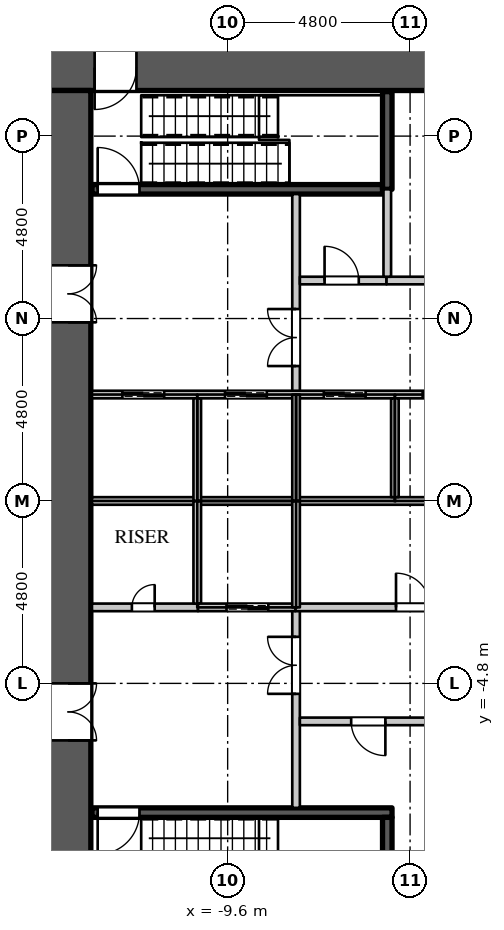
"""IFC4 building model, lengths in metres.
Left out: names, types, materials, properties, quantities, classifications, styles, units other than length and angle.
Written with IfcOpenShell. Run it as: python <this file> out.ifc"""

import sys

from ifc_helpers import new_model, si_unit, direction, frame, frame_2d, origin, place, context, subcontext, project, spatial, rectangle, extrude, element, fill, save


model = new_model("IFC4")
c1 = context("Model", 3, precision=1e-05, world=origin(), true_north=direction((0.0, 1.0)))
c2 = subcontext(c1, "Body", "Model", "MODEL_VIEW")
j1 = project(units=[si_unit("LENGTHUNIT", "METRE"), si_unit("PLANEANGLEUNIT", "RADIAN")], contexts=[c1])
p1 = place(None, origin())
s1 = spatial("IfcSite", under=j1, at=p1, CompositionType="ELEMENT")
p2 = place(p1, origin())
s2 = spatial("IfcBuilding", under=s1, at=p2, CompositionType="ELEMENT")
p3 = place(p2, frame((0.0, 0.0, -9.0)))
s3 = spatial("IfcBuildingStorey", under=s2, at=p3, CompositionType="ELEMENT", Elevation=-9.0)
p4 = place(p3, frame((-14.4, 11.4, 0.0), z_axis=(0.0, 0.0, 1.0), x_axis=(1.0, 0.0, 0.0)))
e1 = element("IfcWall", 1, at=p4, inside=s3, PredefinedType="SHEAR", context=c2, shape_type="SweptSolid", body=[
    extrude(rectangle(XDim=28.8, YDim=1.2, at=frame_2d((14.4, 0.0))), origin(), (0.0, 0.0, 1.0), 4.5),
])
p5 = place(p4, frame((1.3, 0.0, 0.0)))
e2 = element("IfcOpeningElement", 2, at=p5, cuts=e1, PredefinedType="OPENING", context=c2, shape_type="SweptSolid", body=[
    extrude(rectangle(XDim=1.1, YDim=2.2, at=frame_2d((0.55, 1.1))), frame((0.0, 0.61, 0.0), z_axis=(0.0, -1.0, 0.0), x_axis=(1.0, 0.0, 0.0)), (0.0, 0.0, 1.0), 1.22),
])
p6 = place(p4, frame((26.4, 0.0, 0.0)))
e3 = element("IfcOpeningElement", 3, at=p6, cuts=e1, PredefinedType="OPENING", context=c2, shape_type="SweptSolid", body=[
    extrude(rectangle(XDim=1.1, YDim=2.2, at=frame_2d((0.55, 1.1))), frame((0.0, 0.61, 0.0), z_axis=(0.0, -1.0, 0.0), x_axis=(1.0, 0.0, 0.0)), (0.0, 0.0, 1.0), 1.22),
])
p7 = place(p3, frame((-13.8, -10.8, 0.0), z_axis=(0.0, 0.0, 1.0), x_axis=(0.0, 1.0, 0.0)))
e4 = element("IfcWall", 4, at=p7, inside=s3, PredefinedType="SHEAR", context=c2, shape_type="SweptSolid", body=[
    extrude(rectangle(XDim=21.6, YDim=1.2, at=frame_2d((10.8, 0.0))), origin(), (0.0, 0.0, 1.0), 4.5),
])
p8 = place(p7, frame((15.5, 0.0, 0.0)))
e5 = element("IfcOpeningElement", 5, at=p8, cuts=e4, PredefinedType="OPENING", context=c2, shape_type="SweptSolid", body=[
    extrude(rectangle(XDim=1.5, YDim=2.4, at=frame_2d((0.75, 1.2))), frame((0.0, 0.61, 0.0), z_axis=(0.0, -1.0, 0.0), x_axis=(1.0, 0.0, 0.0)), (0.0, 0.0, 1.0), 1.22),
])
p9 = place(p7, frame((4.5, 0.0, 0.0)))
e6 = element("IfcOpeningElement", 6, at=p9, cuts=e4, PredefinedType="OPENING", context=c2, shape_type="SweptSolid", body=[
    extrude(rectangle(XDim=1.5, YDim=2.4, at=frame_2d((0.75, 1.2))), frame((0.0, 0.61, 0.0), z_axis=(0.0, -1.0, 0.0), x_axis=(1.0, 0.0, 0.0)), (0.0, 0.0, 1.0), 1.22),
])
p10 = place(p3, frame((-7.8, -8.075, 0.0), z_axis=(0.0, 0.0, 1.0), x_axis=(0.0, 1.0, 0.0)))
e7 = element("IfcWall", 7, at=p10, inside=s3, PredefinedType="PARTITIONING", context=c2, shape_type="SweptSolid", body=[
    extrude(rectangle(XDim=5.275, YDim=0.2, at=frame_2d((2.637, 0.0))), origin(), (0.0, 0.0, 1.0), 4.048),
])
p11 = place(p10, frame((3.0, 0.0, 0.0)))
e8 = element("IfcOpeningElement", 8, at=p11, cuts=e7, PredefinedType="OPENING", context=c2, shape_type="SweptSolid", body=[
    extrude(rectangle(XDim=1.5, YDim=2.4, at=frame_2d((0.75, 1.2))), frame((0.0, 0.11, 0.0), z_axis=(0.0, -1.0, 0.0), x_axis=(1.0, 0.0, 0.0)), (0.0, 0.0, 1.0), 0.22),
])
p12 = place(p3, frame((-7.7, -5.8, 0.0), z_axis=(0.0, 0.0, 1.0), x_axis=(1.0, 0.0, 0.0)))
e9 = element("IfcWall", 9, at=p12, inside=s3, PredefinedType="PARTITIONING", context=c2, shape_type="SweptSolid", body=[
    extrude(rectangle(XDim=20.87, YDim=0.2, at=frame_2d((10.435, 0.0))), origin(), (0.0, 0.0, 1.0), 4.048),
])
p13 = place(p12, frame((1.35, 0.0, 0.0)))
e10 = element("IfcOpeningElement", 10, at=p13, cuts=e9, PredefinedType="OPENING", context=c2, shape_type="SweptSolid", body=[
    extrude(rectangle(XDim=0.9, YDim=2.2, at=frame_2d((0.45, 1.1))), frame((0.0, 0.11, 0.0), z_axis=(0.0, -1.0, 0.0), x_axis=(1.0, 0.0, 0.0)), (0.0, 0.0, 1.0), 0.22),
])
p14 = place(p12, frame((5.75, 0.0, 0.0)))
e11 = element("IfcOpeningElement", 11, at=p14, cuts=e9, PredefinedType="OPENING", context=c2, shape_type="SweptSolid", body=[
    extrude(rectangle(XDim=0.9, YDim=2.2, at=frame_2d((0.45, 1.1))), frame((0.0, 0.11, 0.0), z_axis=(0.0, -1.0, 0.0), x_axis=(1.0, 0.0, 0.0)), (0.0, 0.0, 1.0), 0.22),
])
p15 = place(p12, frame((12.0, 0.0, 0.0)))
e12 = element("IfcOpeningElement", 12, at=p15, cuts=e9, PredefinedType="OPENING", context=c2, shape_type="SweptSolid", body=[
    extrude(rectangle(XDim=0.9, YDim=2.2, at=frame_2d((0.45, 1.1))), frame((0.0, 0.11, 0.0), z_axis=(0.0, -1.0, 0.0), x_axis=(1.0, 0.0, 0.0)), (0.0, 0.0, 1.0), 0.22),
])
p16 = place(p12, frame((17.95, 0.0, 0.0)))
e13 = element("IfcOpeningElement", 13, at=p16, cuts=e9, PredefinedType="OPENING", context=c2, shape_type="SweptSolid", body=[
    extrude(rectangle(XDim=0.9, YDim=2.2, at=frame_2d((0.45, 1.1))), frame((0.0, 0.11, 0.0), z_axis=(0.0, -1.0, 0.0), x_axis=(1.0, 0.0, 0.0)), (0.0, 0.0, 1.0), 0.22),
])
p17 = place(p3, frame((-7.8, 2.8, 0.0), z_axis=(0.0, 0.0, 1.0), x_axis=(0.0, 1.0, 0.0)))
e14 = element("IfcWall", 14, at=p17, inside=s3, PredefinedType="PARTITIONING", context=c2, shape_type="SweptSolid", body=[
    extrude(rectangle(XDim=5.275, YDim=0.2, at=frame_2d((2.637, 0.0))), origin(), (0.0, 0.0, 1.0), 4.048),
])
p18 = place(p17, frame((0.75, 0.0, 0.0)))
e15 = element("IfcOpeningElement", 15, at=p18, cuts=e14, PredefinedType="OPENING", context=c2, shape_type="SweptSolid", body=[
    extrude(rectangle(XDim=1.5, YDim=2.4, at=frame_2d((0.75, 1.2))), frame((0.0, 0.11, 0.0), z_axis=(0.0, -1.0, 0.0), x_axis=(1.0, 0.0, 0.0)), (0.0, 0.0, 1.0), 0.22),
])
p19 = place(p3, frame((-7.7, 5.8, 0.0), z_axis=(0.0, 0.0, 1.0), x_axis=(1.0, 0.0, 0.0)))
e16 = element("IfcWall", 16, at=p19, inside=s3, PredefinedType="PARTITIONING", context=c2, shape_type="SweptSolid", body=[
    extrude(rectangle(XDim=2.28, YDim=0.2, at=frame_2d((1.14, 0.0))), origin(), (0.0, 0.0, 1.0), 4.048),
])
p20 = place(p19, frame((0.65, 0.0, 0.0)))
e17 = element("IfcOpeningElement", 17, at=p20, cuts=e16, PredefinedType="OPENING", context=c2, shape_type="SweptSolid", body=[
    extrude(rectangle(XDim=0.9, YDim=2.2, at=frame_2d((0.45, 1.1))), frame((0.0, 0.11, 0.0), z_axis=(0.0, -1.0, 0.0), x_axis=(1.0, 0.0, 0.0)), (0.0, 0.0, 1.0), 0.22),
])
p21 = place(p3, frame((-13.17, -2.8, 0.0), z_axis=(0.0, 0.0, 1.0), x_axis=(1.0, 0.0, 0.0)))
e18 = element("IfcWall", 18, at=p21, inside=s3, PredefinedType="PARTITIONING", context=c2, shape_type="SweptSolid", body=[
    extrude(rectangle(XDim=2.79, YDim=0.2, at=frame_2d((1.395, 0.0))), origin(), (0.0, 0.0, 1.0), 4.048),
])
p22 = place(p21, frame((1.05, 0.0, 0.0)))
e19 = element("IfcOpeningElement", 19, at=p22, cuts=e18, PredefinedType="OPENING", context=c2, shape_type="SweptSolid", body=[
    extrude(rectangle(XDim=0.6, YDim=2.0, at=frame_2d((0.3, 1.0))), frame((0.0, 0.11, 0.0), z_axis=(0.0, -1.0, 0.0), x_axis=(1.0, 0.0, 0.0)), (0.0, 0.0, 1.0), 0.22),
])
p23 = place(p3, frame((-7.82, -2.8, 0.0), z_axis=(0.0, 0.0, 1.0), x_axis=(1.0, 0.0, 0.0)))
e20 = element("IfcWall", 20, at=p23, inside=s3, PredefinedType="PARTITIONING", context=c2, shape_type="SweptSolid", body=[
    extrude(rectangle(XDim=6.2, YDim=0.2, at=frame_2d((3.1, 0.0))), origin(), (0.0, 0.0, 1.0), 4.048),
])
p24 = place(p23, frame((2.65, 0.0, 0.0)))
e21 = element("IfcOpeningElement", 21, at=p24, cuts=e20, PredefinedType="OPENING", context=c2, shape_type="SweptSolid", body=[
    extrude(rectangle(XDim=0.9, YDim=2.2, at=frame_2d((0.45, 1.1))), frame((0.0, 0.11, 0.0), z_axis=(0.0, -1.0, 0.0), x_axis=(1.0, 0.0, 0.0)), (0.0, 0.0, 1.0), 0.22),
])
p25 = place(p3, frame((-5.42, 5.8, 0.0), z_axis=(0.0, 0.0, 1.0), x_axis=(1.0, 0.0, 0.0)))
e22 = element("IfcWall", 22, at=p25, inside=s3, PredefinedType="PARTITIONING", context=c2, shape_type="SweptSolid", body=[
    extrude(rectangle(XDim=10.04, YDim=0.2, at=frame_2d((5.02, 0.0))), origin(), (0.0, 0.0, 1.0), 4.048),
])
p26 = place(p25, frame((1.8, 0.0, 0.0)))
e23 = element("IfcOpeningElement", 23, at=p26, cuts=e22, PredefinedType="OPENING", context=c2, shape_type="SweptSolid", body=[
    extrude(rectangle(XDim=0.9, YDim=2.2, at=frame_2d((0.45, 1.1))), frame((0.0, 0.11, 0.0), z_axis=(0.0, -1.0, 0.0), x_axis=(1.0, 0.0, 0.0)), (0.0, 0.0, 1.0), 0.22),
])
p27 = place(p25, frame((6.7, 0.0, 0.0)))
e24 = element("IfcOpeningElement", 24, at=p27, cuts=e22, PredefinedType="OPENING", context=c2, shape_type="SweptSolid", body=[
    extrude(rectangle(XDim=0.9, YDim=2.2, at=frame_2d((0.45, 1.1))), frame((0.0, 0.11, 0.0), z_axis=(0.0, -1.0, 0.0), x_axis=(1.0, 0.0, 0.0)), (0.0, 0.0, 1.0), 0.22),
])
p28 = place(p3, frame((-5.4, 5.9, 0.0), z_axis=(0.0, 0.0, 1.0), x_axis=(0.0, 1.0, 0.0)))
e25 = element("IfcWall", 25, at=p28, inside=s3, PredefinedType="PARTITIONING", context=c2, shape_type="SweptSolid", body=[
    extrude(rectangle(XDim=2.3, YDim=0.2, at=frame_2d((1.15, 0.0))), origin(), (0.0, 0.0, 1.0), 4.048),
])
p29 = place(p3, frame((-13.17, 0.0, 0.0), z_axis=(0.0, 0.0, 1.0), x_axis=(1.0, 0.0, 0.0)))
e26 = element("IfcWall", 26, at=p29, inside=s3, PredefinedType="PARTITIONING", context=c2, shape_type="SweptSolid", body=[
    extrude(rectangle(XDim=20.97, YDim=0.2, at=frame_2d((10.485, 0.0))), origin(), (0.0, 0.0, 1.0), 4.048),
])
p30 = place(p3, frame((-13.17, 2.8, 0.0), z_axis=(0.0, 0.0, 1.0), x_axis=(1.0, 0.0, 0.0)))
e27 = element("IfcWall", 27, at=p30, inside=s3, PredefinedType="PARTITIONING", context=c2, shape_type="SweptSolid", body=[
    extrude(rectangle(XDim=20.97, YDim=0.2, at=frame_2d((10.485, 0.0))), origin(), (0.0, 0.0, 1.0), 4.048),
])
p31 = place(p30, frame((0.8, 0.0, 0.0)))
e28 = element("IfcOpeningElement", 28, at=p31, cuts=e27, PredefinedType="OPENING", context=c2, shape_type="SweptSolid", body=[
    extrude(rectangle(XDim=1.1, YDim=2.2, at=frame_2d((0.55, 1.1))), frame((0.0, 0.11, 0.0), z_axis=(0.0, -1.0, 0.0), x_axis=(1.0, 0.0, 0.0)), (0.0, 0.0, 1.0), 0.22),
])
p32 = place(p30, frame((3.5, 0.0, 0.0)))
e29 = element("IfcOpeningElement", 29, at=p32, cuts=e27, PredefinedType="OPENING", context=c2, shape_type="SweptSolid", body=[
    extrude(rectangle(XDim=1.1, YDim=2.2, at=frame_2d((0.55, 1.1))), frame((0.0, 0.11, 0.0), z_axis=(0.0, -1.0, 0.0), x_axis=(1.0, 0.0, 0.0)), (0.0, 0.0, 1.0), 0.22),
])
p33 = place(p30, frame((6.1, 0.0, 0.0)))
e30 = element("IfcOpeningElement", 30, at=p33, cuts=e27, PredefinedType="OPENING", context=c2, shape_type="SweptSolid", body=[
    extrude(rectangle(XDim=1.1, YDim=2.2, at=frame_2d((0.55, 1.1))), frame((0.0, 0.11, 0.0), z_axis=(0.0, -1.0, 0.0), x_axis=(1.0, 0.0, 0.0)), (0.0, 0.0, 1.0), 0.22),
])
p34 = place(p30, frame((8.7, 0.0, 0.0)))
e31 = element("IfcOpeningElement", 31, at=p34, cuts=e27, PredefinedType="OPENING", context=c2, shape_type="SweptSolid", body=[
    extrude(rectangle(XDim=1.1, YDim=2.2, at=frame_2d((0.55, 1.1))), frame((0.0, 0.11, 0.0), z_axis=(0.0, -1.0, 0.0), x_axis=(1.0, 0.0, 0.0)), (0.0, 0.0, 1.0), 0.22),
])
p35 = place(p30, frame((11.3, 0.0, 0.0)))
e32 = element("IfcOpeningElement", 32, at=p35, cuts=e27, PredefinedType="OPENING", context=c2, shape_type="SweptSolid", body=[
    extrude(rectangle(XDim=1.1, YDim=2.2, at=frame_2d((0.55, 1.1))), frame((0.0, 0.11, 0.0), z_axis=(0.0, -1.0, 0.0), x_axis=(1.0, 0.0, 0.0)), (0.0, 0.0, 1.0), 0.22),
])
p36 = place(p30, frame((13.9, 0.0, 0.0)))
e33 = element("IfcOpeningElement", 33, at=p36, cuts=e27, PredefinedType="OPENING", context=c2, shape_type="SweptSolid", body=[
    extrude(rectangle(XDim=1.1, YDim=2.2, at=frame_2d((0.55, 1.1))), frame((0.0, 0.11, 0.0), z_axis=(0.0, -1.0, 0.0), x_axis=(1.0, 0.0, 0.0)), (0.0, 0.0, 1.0), 0.22),
])
p37 = place(p30, frame((16.5, 0.0, 0.0)))
e34 = element("IfcOpeningElement", 34, at=p37, cuts=e27, PredefinedType="OPENING", context=c2, shape_type="SweptSolid", body=[
    extrude(rectangle(XDim=1.1, YDim=2.2, at=frame_2d((0.55, 1.1))), frame((0.0, 0.11, 0.0), z_axis=(0.0, -1.0, 0.0), x_axis=(1.0, 0.0, 0.0)), (0.0, 0.0, 1.0), 0.22),
])
p38 = place(p30, frame((19.1, 0.0, 0.0)))
e35 = element("IfcOpeningElement", 35, at=p38, cuts=e27, PredefinedType="OPENING", context=c2, shape_type="SweptSolid", body=[
    extrude(rectangle(XDim=1.1, YDim=2.2, at=frame_2d((0.55, 1.1))), frame((0.0, 0.11, 0.0), z_axis=(0.0, -1.0, 0.0), x_axis=(1.0, 0.0, 0.0)), (0.0, 0.0, 1.0), 0.22),
])
p39 = place(p3, frame((-10.4, -2.7, 0.0), z_axis=(0.0, 0.0, 1.0), x_axis=(0.0, 1.0, 0.0)))
e36 = element("IfcWall", 36, at=p39, inside=s3, PredefinedType="PARTITIONING", context=c2, shape_type="SweptSolid", body=[
    extrude(rectangle(XDim=2.7, YDim=0.2, at=frame_2d((1.35, 0.0))), origin(), (0.0, 0.0, 1.0), 4.048),
])
p40 = place(p3, frame((-10.38, -2.8, 0.0), z_axis=(0.0, 0.0, 1.0), x_axis=(1.0, 0.0, 0.0)))
e37 = element("IfcWall", 37, at=p40, inside=s3, PredefinedType="PARTITIONING", context=c2, shape_type="SweptSolid", body=[
    extrude(rectangle(XDim=2.56, YDim=0.2, at=frame_2d((1.28, 0.0))), origin(), (0.0, 0.0, 1.0), 4.048),
])
p41 = place(p40, frame((0.75, 0.0, 0.0)))
e38 = element("IfcOpeningElement", 38, at=p41, cuts=e37, PredefinedType="OPENING", context=c2, shape_type="SweptSolid", body=[
    extrude(rectangle(XDim=1.1, YDim=2.2, at=frame_2d((0.55, 1.1))), frame((0.0, 0.11, 0.0), z_axis=(0.0, -1.0, 0.0), x_axis=(1.0, 0.0, 0.0)), (0.0, 0.0, 1.0), 0.22),
])
p42 = place(p3, frame((-10.4, 0.0, 0.0), z_axis=(0.0, 0.0, 1.0), x_axis=(0.0, 1.0, 0.0)))
e39 = element("IfcWall", 39, at=p42, inside=s3, PredefinedType="PARTITIONING", context=c2, shape_type="SweptSolid", body=[
    extrude(rectangle(XDim=2.7, YDim=0.2, at=frame_2d((1.35, 0.0))), origin(), (0.0, 0.0, 1.0), 4.048),
])
for number, where, z_axis, x_axis in (
    (40, (-7.8, -2.8, 0.0), (0.0, 0.0, 1.0), (0.0, 1.0, 0.0)),
    (41, (-7.8, 0.0, 0.0), (0.0, 0.0, 1.0), (0.0, 1.0, 0.0)),
):
    element("IfcWall", number, at=place(p3, frame(where, z_axis=z_axis, x_axis=x_axis)), inside=s3, PredefinedType="PARTITIONING", context=c2, shape_type="SweptSolid", body=[
        extrude(rectangle(XDim=2.8, YDim=0.2, at=frame_2d((1.4, 0.0))), origin(), (0.0, 0.0, 1.0), 4.048),
    ])
p43 = place(p3, frame((-5.2, 0.1, 0.0), z_axis=(0.0, 0.0, 1.0), x_axis=(0.0, 1.0, 0.0)))
e42 = element("IfcWall", 42, at=p43, inside=s3, PredefinedType="PARTITIONING", context=c2, shape_type="SweptSolid", body=[
    extrude(rectangle(XDim=2.6, YDim=0.2, at=frame_2d((1.3, 0.0))), origin(), (0.0, 0.0, 1.0), 4.048),
])
p44 = place(p3, frame((-13.17, -8.2, 0.0), z_axis=(0.0, 0.0, 1.0), x_axis=(1.0, 0.0, 0.0)))
e43 = element("IfcWall", 43, at=p44, inside=s3, PredefinedType="SHEAR", context=c2, shape_type="SweptSolid", body=[
    extrude(rectangle(XDim=7.895, YDim=0.25, at=frame_2d((3.948, 0.0))), origin(), (0.0, 0.0, 1.0), 4.048),
])
p45 = place(p44, frame((0.15, 0.0, 0.0)))
e44 = element("IfcOpeningElement", 44, at=p45, cuts=e43, PredefinedType="OPENING", context=c2, shape_type="SweptSolid", body=[
    extrude(rectangle(XDim=1.1, YDim=2.2, at=frame_2d((0.55, 1.1))), frame((0.0, 0.135, 0.0), z_axis=(0.0, -1.0, 0.0), x_axis=(1.0, 0.0, 0.0)), (0.0, 0.0, 1.0), 0.27),
])
p46 = place(p3, frame((-13.17, 8.2, 0.0), z_axis=(0.0, 0.0, 1.0), x_axis=(1.0, 0.0, 0.0)))
e45 = element("IfcWall", 45, at=p46, inside=s3, PredefinedType="SHEAR", context=c2, shape_type="SweptSolid", body=[
    extrude(rectangle(XDim=7.645, YDim=0.25, at=frame_2d((3.823, 0.0))), origin(), (0.0, 0.0, 1.0), 4.048),
])
p47 = place(p46, frame((0.15, 0.0, 0.0)))
e46 = element("IfcOpeningElement", 46, at=p47, cuts=e45, PredefinedType="OPENING", context=c2, shape_type="SweptSolid", body=[
    extrude(rectangle(XDim=1.1, YDim=2.2, at=frame_2d((0.55, 1.1))), frame((0.0, 0.135, 0.0), z_axis=(0.0, -1.0, 0.0), x_axis=(1.0, 0.0, 0.0)), (0.0, 0.0, 1.0), 0.27),
])
p48 = place(p3, frame((-5.4, -10.77, 0.0), z_axis=(0.0, 0.0, 1.0), x_axis=(0.0, 1.0, 0.0)))
e47 = element("IfcWall", 47, at=p48, inside=s3, PredefinedType="SHEAR", context=c2, shape_type="SweptSolid", body=[
    extrude(rectangle(XDim=2.445, YDim=0.25, at=frame_2d((1.223, 0.0))), origin(), (0.0, 0.0, 1.0), 4.048),
])
p49 = place(p3, frame((-5.4, 8.2, 0.0), z_axis=(0.0, 0.0, 1.0), x_axis=(0.0, 1.0, 0.0)))
e48 = element("IfcWall", 48, at=p49, inside=s3, PredefinedType="SHEAR", context=c2, shape_type="SweptSolid", body=[
    extrude(rectangle(XDim=2.57, YDim=0.25, at=frame_2d((1.285, 0.0))), origin(), (0.0, 0.0, 1.0), 4.048),
])
p50 = place(p22, origin())
e49 = element("IfcDoor", 49, at=p50, inside=s3, OperationType="SINGLE_SWING_RIGHT", PredefinedType="DOOR", context=c2, shape_type="SweptSolid", body=[
    extrude(rectangle(XDim=0.6, YDim=2.0, at=frame_2d((0.3, 1.0))), frame((0.0, 0.025, 0.0), z_axis=(0.0, -1.0, 0.0), x_axis=(1.0, 0.0, 0.0)), (0.0, 0.0, 1.0), 0.05),
])
fill(e19, e49)
p51 = place(p20, origin())
e50 = element("IfcDoor", 50, at=p51, inside=s3, OperationType="SINGLE_SWING_LEFT", PredefinedType="DOOR", context=c2, shape_type="SweptSolid", body=[
    extrude(rectangle(XDim=0.9, YDim=2.2, at=frame_2d((0.45, 1.1))), frame((0.0, 0.025, 0.0), z_axis=(0.0, -1.0, 0.0), x_axis=(1.0, 0.0, 0.0)), (0.0, 0.0, 1.0), 0.05),
])
fill(e17, e50)
p52 = place(p13, origin())
e51 = element("IfcDoor", 51, at=p52, inside=s3, OperationType="SINGLE_SWING_LEFT", PredefinedType="DOOR", context=c2, shape_type="SweptSolid", body=[
    extrude(rectangle(XDim=0.9, YDim=2.2, at=frame_2d((0.45, 1.1))), frame((0.0, 0.025, 0.0), z_axis=(0.0, -1.0, 0.0), x_axis=(1.0, 0.0, 0.0)), (0.0, 0.0, 1.0), 0.05),
])
fill(e10, e51)
p53 = place(p24, origin())
e52 = element("IfcDoor", 52, at=p53, inside=s3, OperationType="SINGLE_SWING_LEFT", PredefinedType="DOOR", context=c2, shape_type="SweptSolid", body=[
    extrude(rectangle(XDim=0.9, YDim=2.2, at=frame_2d((0.45, 1.1))), frame((0.0, 0.025, 0.0), z_axis=(0.0, -1.0, 0.0), x_axis=(1.0, 0.0, 0.0)), (0.0, 0.0, 1.0), 0.05),
])
fill(e21, e52)
p54 = place(p31, origin())
e53 = element("IfcDoor", 53, at=p54, inside=s3, OperationType="DOUBLE_DOOR_SLIDING", PredefinedType="DOOR", context=c2, shape_type="SweptSolid", body=[
    extrude(rectangle(XDim=1.1, YDim=2.2, at=frame_2d((0.55, 1.1))), frame((0.0, 0.025, 0.0), z_axis=(0.0, -1.0, 0.0), x_axis=(1.0, 0.0, 0.0)), (0.0, 0.0, 1.0), 0.05),
])
fill(e28, e53)
p55 = place(p32, origin())
e54 = element("IfcDoor", 54, at=p55, inside=s3, OperationType="DOUBLE_DOOR_SLIDING", PredefinedType="DOOR", context=c2, shape_type="SweptSolid", body=[
    extrude(rectangle(XDim=1.1, YDim=2.2, at=frame_2d((0.55, 1.1))), frame((0.0, 0.025, 0.0), z_axis=(0.0, -1.0, 0.0), x_axis=(1.0, 0.0, 0.0)), (0.0, 0.0, 1.0), 0.05),
])
fill(e29, e54)
p56 = place(p41, origin())
e55 = element("IfcDoor", 55, at=p56, inside=s3, OperationType="DOUBLE_DOOR_SLIDING", PredefinedType="DOOR", context=c2, shape_type="SweptSolid", body=[
    extrude(rectangle(XDim=1.1, YDim=2.2, at=frame_2d((0.55, 1.1))), frame((0.0, 0.025, 0.0), z_axis=(0.0, -1.0, 0.0), x_axis=(1.0, 0.0, 0.0)), (0.0, 0.0, 1.0), 0.05),
])
fill(e38, e55)
p57 = place(p33, origin())
e56 = element("IfcDoor", 56, at=p57, inside=s3, OperationType="DOUBLE_DOOR_SLIDING", PredefinedType="DOOR", context=c2, shape_type="SweptSolid", body=[
    extrude(rectangle(XDim=1.1, YDim=2.2, at=frame_2d((0.55, 1.1))), frame((0.0, 0.025, 0.0), z_axis=(0.0, -1.0, 0.0), x_axis=(1.0, 0.0, 0.0)), (0.0, 0.0, 1.0), 0.05),
])
fill(e30, e56)
p58 = place(p34, origin())
e57 = element("IfcDoor", 57, at=p58, inside=s3, OperationType="DOUBLE_DOOR_SLIDING", PredefinedType="DOOR", context=c2, shape_type="SweptSolid", body=[
    extrude(rectangle(XDim=1.1, YDim=2.2, at=frame_2d((0.55, 1.1))), frame((0.0, 0.025, 0.0), z_axis=(0.0, -1.0, 0.0), x_axis=(1.0, 0.0, 0.0)), (0.0, 0.0, 1.0), 0.05),
])
fill(e31, e57)
p59 = place(p47, origin())
e58 = element("IfcDoor", 58, at=p59, inside=s3, OperationType="SINGLE_SWING_LEFT", PredefinedType="DOOR", context=c2, shape_type="SweptSolid", body=[
    extrude(rectangle(XDim=1.1, YDim=2.2, at=frame_2d((0.55, 1.1))), frame((0.0, 0.025, 0.0), z_axis=(0.0, -1.0, 0.0), x_axis=(1.0, 0.0, 0.0)), (0.0, 0.0, 1.0), 0.05),
])
fill(e46, e58)
p60 = place(p45, origin())
e59 = element("IfcDoor", 59, at=p60, inside=s3, OperationType="SINGLE_SWING_RIGHT", PredefinedType="DOOR", context=c2, shape_type="SweptSolid", body=[
    extrude(rectangle(XDim=1.1, YDim=2.2, at=frame_2d((0.55, 1.1))), frame((0.0, 0.025, 0.0), z_axis=(0.0, -1.0, 0.0), x_axis=(1.0, 0.0, 0.0)), (0.0, 0.0, 1.0), 0.05),
])
fill(e44, e59)
p61 = place(p18, origin())
e60 = element("IfcDoor", 60, at=p61, inside=s3, OperationType="DOUBLE_DOOR_SINGLE_SWING", PredefinedType="DOOR", context=c2, shape_type="SweptSolid", body=[
    extrude(rectangle(XDim=1.5, YDim=2.4, at=frame_2d((0.75, 1.2))), frame((0.0, 0.025, 0.0), z_axis=(0.0, -1.0, 0.0), x_axis=(1.0, 0.0, 0.0)), (0.0, 0.0, 1.0), 0.05),
])
fill(e15, e60)
p62 = place(p11, origin())
e61 = element("IfcDoor", 61, at=p62, inside=s3, OperationType="DOUBLE_DOOR_SINGLE_SWING", PredefinedType="DOOR", context=c2, shape_type="SweptSolid", body=[
    extrude(rectangle(XDim=1.5, YDim=2.4, at=frame_2d((0.75, 1.2))), frame((0.0, 0.025, 0.0), z_axis=(0.0, -1.0, 0.0), x_axis=(1.0, 0.0, 0.0)), (0.0, 0.0, 1.0), 0.05),
])
fill(e8, e61)
p63 = place(p8, origin())
e62 = element("IfcDoor", 62, at=p63, inside=s3, OperationType="DOUBLE_DOOR_SINGLE_SWING", PredefinedType="DOOR", context=c2, shape_type="SweptSolid", body=[
    extrude(rectangle(XDim=1.5, YDim=2.4, at=frame_2d((0.75, 1.2))), frame((0.0, 0.025, 0.0), z_axis=(0.0, -1.0, 0.0), x_axis=(1.0, 0.0, 0.0)), (0.0, 0.0, 1.0), 0.05),
])
fill(e5, e62)
p64 = place(p9, origin())
e63 = element("IfcDoor", 63, at=p64, inside=s3, OperationType="DOUBLE_DOOR_SINGLE_SWING", PredefinedType="DOOR", context=c2, shape_type="SweptSolid", body=[
    extrude(rectangle(XDim=1.5, YDim=2.4, at=frame_2d((0.75, 1.2))), frame((0.0, 0.025, 0.0), z_axis=(0.0, -1.0, 0.0), x_axis=(1.0, 0.0, 0.0)), (0.0, 0.0, 1.0), 0.05),
])
fill(e6, e63)
p65 = place(p5, origin())
e64 = element("IfcDoor", 64, at=p65, inside=s3, OperationType="SINGLE_SWING_RIGHT", PredefinedType="DOOR", context=c2, shape_type="SweptSolid", body=[
    extrude(rectangle(XDim=1.1, YDim=2.2, at=frame_2d((0.55, 1.1))), frame((0.0, 0.025, 0.0), z_axis=(0.0, -1.0, 0.0), x_axis=(1.0, 0.0, 0.0)), (0.0, 0.0, 1.0), 0.05),
])
fill(e2, e64)
save(model, sys.argv[1])
